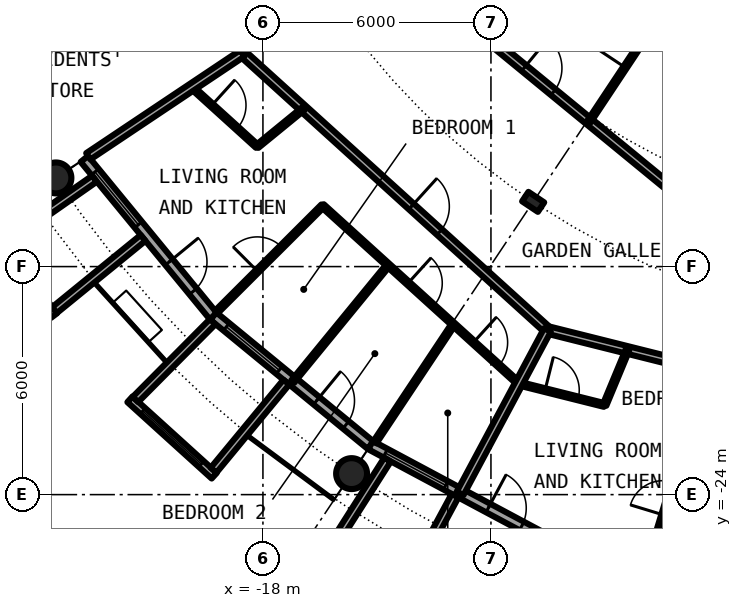
"""IFC4 building model, lengths in metres.
Left out: names, types, materials, properties, quantities, classifications, styles, units other than length and angle.
Written with IfcOpenShell. Run it as: python <this file> out.ifc"""

import sys

from ifc_helpers import new_model, si_unit, direction, frame, frame_2d, origin, origin_2d, place, context, subcontext, project, spatial, rectangle, circle, hollow_circle, i_section, extrude, element, fill, save


model = new_model("IFC4")
c1 = context("Model", 3, precision=1e-05, world=origin(), true_north=direction((0.0, 1.0)))
c2 = subcontext(c1, "Body", "Model", "MODEL_VIEW")
j1 = project(units=[si_unit("LENGTHUNIT", "METRE"), si_unit("PLANEANGLEUNIT", "RADIAN")], contexts=[c1])
p1 = place(None, origin())
s1 = spatial("IfcSite", under=j1, at=p1, CompositionType="ELEMENT")
p2 = place(p1, origin())
s2 = spatial("IfcBuilding", under=s1, at=p2, CompositionType="ELEMENT")
p3 = place(p2, frame((0.0, 0.0, 161.6)))
s3 = spatial("IfcBuildingStorey", under=s2, at=p3, CompositionType="ELEMENT", Elevation=161.6)
for number, where, z_axis, x_axis in (
    (1, (-23.448, -15.667, 0.0), (0.0, 0.0, 1.0), (1.0, 0.0, 0.0)),
    (2, (-15.667, -23.448, 0.0), (0.0, 0.0, 1.0), (1.0, 0.0, 0.0)),
):
    element("IfcColumn", number, at=place(p3, frame(where, z_axis=z_axis, x_axis=x_axis)), inside=s3, PredefinedType="COLUMN", context=c2, shape_type="SweptSolid", body=[
        extrude(hollow_circle(Radius=0.406, WallThickness=0.04, at=origin_2d()), origin(), (0.0, 0.0, 1.0), 3.05),
    ])
p4 = place(p3, frame((-10.889, -16.297, 0.0), z_axis=(0.0, 0.0, 1.0), x_axis=(-0.55557023302, -0.831469612303, 0.0)))
e3 = element("IfcColumn", 3, at=p4, inside=s3, PredefinedType="COLUMN", context=c2, shape_type="SweptSolid", body=[
    extrude(i_section(OverallWidth=0.3, OverallDepth=0.5, WebThickness=0.014, FlangeThickness=0.028, FilletRadius=0.027, at=origin_2d()), origin(), (0.0, 0.0, 1.0), 3.05),
])
p5 = place(p3, frame((-22.699, -15.167, 0.0), z_axis=(0.0, 0.0, 1.0), x_axis=(0.634382322723, -0.773019449054, 0.0)))
e4 = element("IfcWall", 4, at=p5, inside=s3, PredefinedType="SOLIDWALL", context=c2, shape_type="SweptSolid", body=[
    extrude(rectangle(XDim=5.352, YDim=0.25, at=frame_2d((2.676, 0.0))), origin(), (0.0, 0.0, 1.0), 2.7),
])
p6 = place(p5, frame((0.441, 0.0, 0.3)))
e5 = element("IfcOpeningElement", 5, at=p6, cuts=e4, PredefinedType="OPENING", context=c2, shape_type="SweptSolid", body=[
    extrude(rectangle(XDim=1.8, YDim=2.1, at=frame_2d((0.9, 1.05))), frame((0.0, 0.135, 0.0), z_axis=(0.0, -1.0, 0.0), x_axis=(1.0, 0.0, 0.0)), (0.0, 0.0, 1.0), 0.27),
])
p7 = place(p5, frame((3.51, 0.0, 0.0)))
e6 = element("IfcOpeningElement", 6, at=p7, cuts=e4, PredefinedType="OPENING", context=c2, shape_type="SweptSolid", body=[
    extrude(rectangle(XDim=1.0, YDim=2.2, at=frame_2d((0.5, 1.1))), frame((0.0, 0.135, 0.0), z_axis=(0.0, -1.0, 0.0), x_axis=(1.0, 0.0, 0.0)), (0.0, 0.0, 1.0), 0.27),
])
p8 = place(p3, frame((-24.972, -17.337, -0.03), z_axis=(0.0, 0.0, 1.0), x_axis=(0.602806268067, -0.797887588059, 0.0)))
e7 = element("IfcWall", 7, at=p8, inside=s3, PredefinedType="SOLIDWALL", context=c2, shape_type="SweptSolid", body=[
    extrude(rectangle(XDim=2.447, YDim=0.2, at=frame_2d((1.223, 0.0))), origin(), (0.0, 0.0, 1.0), 2.73),
])
p9 = place(p8, frame((0.183, 0.0, 0.33)))
e8 = element("IfcOpeningElement", 8, at=p9, cuts=e7, PredefinedType="OPENING", context=c2, shape_type="SweptSolid", body=[
    extrude(circle(Radius=1.04, at=frame_2d((1.04, 1.04))), frame((0.0, 0.11, 0.0), z_axis=(0.0, -1.0, 0.0), x_axis=(1.0, 0.0, 0.0)), (0.0, 0.0, 1.0), 0.22),
])
p10 = place(p3, frame((-22.433, -15.688, -0.03), z_axis=(0.0, 0.0, 1.0), x_axis=(-0.819373043115, -0.573260687834, 0.0)))
e9 = element("IfcWall", 9, at=p10, inside=s3, PredefinedType="SOLIDWALL", context=c2, shape_type="SweptSolid", body=[
    extrude(rectangle(XDim=2.925, YDim=0.2, at=frame_2d((1.463, 0.0))), origin(), (0.0, 0.0, 1.0), 2.73),
])
p11 = place(p3, frame((-21.155, -17.246, -0.03), z_axis=(0.0, 0.0, 1.0), x_axis=(-0.775179004516, -0.631741648902, 0.0)))
e10 = element("IfcWall", 10, at=p11, inside=s3, PredefinedType="SOLIDWALL", context=c2, shape_type="SweptSolid", body=[
    extrude(rectangle(XDim=3.006, YDim=0.2, at=frame_2d((1.503, 0.0))), origin(), (0.0, 0.0, 1.0), 2.73),
])
p12 = place(p3, frame((-19.304, -19.304, 0.0), z_axis=(0.0, 0.0, 1.0), x_axis=(0.773019449054, -0.634382322723, 0.0)))
e11 = element("IfcWall", 11, at=p12, inside=s3, PredefinedType="SOLIDWALL", context=c2, shape_type="SweptSolid", body=[
    extrude(rectangle(XDim=5.352, YDim=0.25, at=frame_2d((2.676, 0.0))), origin(), (0.0, 0.0, 1.0), 2.7),
])
p13 = place(p12, frame((0.441, 0.0, 0.3)))
e12 = element("IfcOpeningElement", 12, at=p13, cuts=e11, PredefinedType="OPENING", context=c2, shape_type="SweptSolid", body=[
    extrude(rectangle(XDim=1.8, YDim=2.1, at=frame_2d((0.9, 1.05))), frame((0.0, 0.135, 0.0), z_axis=(0.0, -1.0, 0.0), x_axis=(1.0, 0.0, 0.0)), (0.0, 0.0, 1.0), 0.27),
])
p14 = place(p12, frame((3.51, 0.0, 0.0)))
e13 = element("IfcOpeningElement", 13, at=p14, cuts=e11, PredefinedType="OPENING", context=c2, shape_type="SweptSolid", body=[
    extrude(rectangle(XDim=1.0, YDim=2.2, at=frame_2d((0.5, 1.1))), frame((0.0, 0.135, 0.0), z_axis=(0.0, -1.0, 0.0), x_axis=(1.0, 0.0, 0.0)), (0.0, 0.0, 1.0), 0.27),
])
p15 = place(p3, frame((-21.5, -21.493, -0.03), z_axis=(0.0, 0.0, 1.0), x_axis=(0.740998365753, -0.671506829416, 0.0)))
e14 = element("IfcWall", 14, at=p15, inside=s3, PredefinedType="SOLIDWALL", context=c2, shape_type="SweptSolid", body=[
    extrude(rectangle(XDim=2.993, YDim=0.2, at=frame_2d((1.497, 0.0))), origin(), (0.0, 0.0, 1.0), 2.73),
])
p16 = place(p15, frame((0.457, 0.0, 0.33)))
e15 = element("IfcOpeningElement", 15, at=p16, cuts=e14, PredefinedType="OPENING", context=c2, shape_type="SweptSolid", body=[
    extrude(circle(Radius=1.04, at=frame_2d((1.04, 1.04))), frame((0.0, 0.11, 0.0), z_axis=(0.0, -1.0, 0.0), x_axis=(1.0, 0.0, 0.0)), (0.0, 0.0, 1.0), 0.22),
])
p17 = place(p3, frame((-19.323, -19.45, -0.03), z_axis=(0.0, 0.0, 1.0), x_axis=(-0.704476739375, -0.709727076896, 0.0)))
e16 = element("IfcWall", 16, at=p17, inside=s3, PredefinedType="SOLIDWALL", context=c2, shape_type="SweptSolid", body=[
    extrude(rectangle(XDim=2.883, YDim=0.2, at=frame_2d((1.441, 0.0))), origin(), (0.0, 0.0, 1.0), 2.73),
])
p18 = place(p3, frame((-17.384, -21.041, -0.03), z_axis=(0.0, 0.0, 1.0), x_axis=(-0.63709551667, -0.770784861449, 0.0)))
e17 = element("IfcWall", 17, at=p18, inside=s3, PredefinedType="SOLIDWALL", context=c2, shape_type="SweptSolid", body=[
    extrude(rectangle(XDim=3.006, YDim=0.2, at=frame_2d((1.503, 0.0))), origin(), (0.0, 0.0, 1.0), 2.73),
])
p19 = place(p3, frame((-15.167, -22.699, 0.0), z_axis=(0.0, 0.0, 1.0), x_axis=(0.881915646801, -0.471407246368, 0.0)))
e18 = element("IfcWall", 18, at=p19, inside=s3, PredefinedType="SOLIDWALL", context=c2, shape_type="SweptSolid", body=[
    extrude(rectangle(XDim=5.352, YDim=0.25, at=frame_2d((2.676, 0.0))), origin(), (0.0, 0.0, 1.0), 2.7),
])
p20 = place(p19, frame((0.441, 0.0, 0.3)))
e19 = element("IfcOpeningElement", 19, at=p20, cuts=e18, PredefinedType="OPENING", context=c2, shape_type="SweptSolid", body=[
    extrude(rectangle(XDim=1.8, YDim=2.1, at=frame_2d((0.9, 1.05))), frame((0.0, 0.135, 0.0), z_axis=(0.0, -1.0, 0.0), x_axis=(1.0, 0.0, 0.0)), (0.0, 0.0, 1.0), 0.27),
])
p21 = place(p19, frame((3.51, 0.0, 0.0)))
e20 = element("IfcOpeningElement", 20, at=p21, cuts=e18, PredefinedType="OPENING", context=c2, shape_type="SweptSolid", body=[
    extrude(rectangle(XDim=1.0, YDim=2.2, at=frame_2d((0.5, 1.1))), frame((0.0, 0.135, 0.0), z_axis=(0.0, -1.0, 0.0), x_axis=(1.0, 0.0, 0.0)), (0.0, 0.0, 1.0), 0.27),
])
p22 = place(p3, frame((-14.722, -23.079, -0.03), z_axis=(0.0, 0.0, 1.0), x_axis=(-0.537572179146, -0.843217737129, 0.0)))
e21 = element("IfcWall", 21, at=p22, inside=s3, PredefinedType="SOLIDWALL", context=c2, shape_type="SweptSolid", body=[
    extrude(rectangle(XDim=2.924, YDim=0.2, at=frame_2d((1.462, 0.0))), origin(), (0.0, 0.0, 1.0), 2.73),
])
p23 = place(p3, frame((-12.945, -24.029, -0.03), z_axis=(0.0, 0.0, 1.0), x_axis=(-0.474424310775, -0.88029629861, 0.0)))
e22 = element("IfcWall", 22, at=p23, inside=s3, PredefinedType="SOLIDWALL", context=c2, shape_type="SweptSolid", body=[
    extrude(rectangle(XDim=3.006, YDim=0.2, at=frame_2d((1.503, 0.0))), origin(), (0.0, 0.0, 1.0), 2.73),
])
p24 = place(p3, frame((-19.872, -13.278, 0.0), z_axis=(0.0, 0.0, 1.0), x_axis=(0.740990220108, -0.671515817911, 0.0)))
e23 = element("IfcWall", 23, at=p24, inside=s3, PredefinedType="PARTITIONING", context=c2, shape_type="SweptSolid", body=[
    extrude(rectangle(XDim=2.323, YDim=0.1, at=frame_2d((1.161, 0.0))), origin(), (0.0, 0.0, 1.0), 2.7),
])
p25 = place(p24, frame((0.711, 0.0, 0.0)))
e24 = element("IfcOpeningElement", 24, at=p25, cuts=e23, PredefinedType="OPENING", context=c2, shape_type="SweptSolid", body=[
    extrude(rectangle(XDim=0.9, YDim=2.3, at=frame_2d((0.45, 1.15))), frame((0.0, 0.06, 0.0), z_axis=(0.0, -1.0, 0.0), x_axis=(1.0, 0.0, 0.0)), (0.0, 0.0, 1.0), 0.12),
])
p26 = place(p3, frame((-16.432, -16.396, 0.0), z_axis=(0.0, 0.0, 1.0), x_axis=(0.740901429238, -0.671613781986, 0.0)))
e25 = element("IfcWall", 25, at=p26, inside=s3, PredefinedType="PARTITIONING", context=c2, shape_type="SweptSolid", body=[
    extrude(rectangle(XDim=6.97, YDim=0.1, at=frame_2d((3.485, 0.0))), origin(), (0.0, 0.0, 1.0), 2.7),
])
p27 = place(p26, frame((3.038, 0.0, 0.0)))
e26 = element("IfcOpeningElement", 26, at=p27, cuts=e25, PredefinedType="OPENING", context=c2, shape_type="SweptSolid", body=[
    extrude(rectangle(XDim=0.9, YDim=2.3, at=frame_2d((0.45, 1.15))), frame((0.0, 0.06, 0.0), z_axis=(0.0, -1.0, 0.0), x_axis=(1.0, 0.0, 0.0)), (0.0, 0.0, 1.0), 0.12),
])
p28 = place(p26, frame((5.36, 0.0, 0.0)))
e27 = element("IfcOpeningElement", 27, at=p28, cuts=e25, PredefinedType="OPENING", context=c2, shape_type="SweptSolid", body=[
    extrude(rectangle(XDim=0.9, YDim=2.3, at=frame_2d((0.45, 1.15))), frame((0.0, 0.06, 0.0), z_axis=(0.0, -1.0, 0.0), x_axis=(1.0, 0.0, 0.0)), (0.0, 0.0, 1.0), 0.12),
])
p29 = place(p3, frame((-11.268, -21.078, 0.0), z_axis=(0.0, 0.0, 1.0), x_axis=(0.970018653366, -0.243030475708, 0.0)))
e28 = element("IfcWall", 28, at=p29, inside=s3, PredefinedType="PARTITIONING", context=c2, shape_type="SweptSolid", body=[
    extrude(rectangle(XDim=2.322, YDim=0.1, at=frame_2d((1.161, 0.0))), origin(), (0.0, 0.0, 1.0), 2.7),
])
p30 = place(p29, frame((0.713, 0.0, 0.0)))
e29 = element("IfcOpeningElement", 29, at=p30, cuts=e28, PredefinedType="OPENING", context=c2, shape_type="SweptSolid", body=[
    extrude(rectangle(XDim=0.9, YDim=2.3, at=frame_2d((0.45, 1.15))), frame((0.0, 0.06, 0.0), z_axis=(0.0, -1.0, 0.0), x_axis=(1.0, 0.0, 0.0)), (0.0, 0.0, 1.0), 0.12),
])
p31 = place(p3, frame((-19.307, -10.935, 0.0), z_axis=(0.0, 0.0, 1.0), x_axis=(0.465605550524, -0.884992356646, 0.0)))
e30 = element("IfcWall", 30, at=p31, inside=s3, PredefinedType="PARTITIONING", context=c2, shape_type="SweptSolid", body=[
    extrude(rectangle(XDim=1.643, YDim=0.2, at=frame_2d((0.821, 0.0))), origin(), (0.0, 0.0, 1.0), 2.7),
])
p32 = place(p3, frame((-18.542, -12.389, 0.0), z_axis=(0.0, 0.0, 1.0), x_axis=(0.740947367223, -0.671563101283, 0.0)))
e31 = element("IfcWall", 31, at=p32, inside=s3, PredefinedType="PARTITIONING", context=c2, shape_type="SweptSolid", body=[
    extrude(rectangle(XDim=10.837, YDim=0.2, at=frame_2d((5.419, 0.0))), origin(), (0.0, 0.0, 1.0), 2.7),
])
p33 = place(p32, frame((6.002, 0.0, 0.0)))
e32 = element("IfcOpeningElement", 32, at=p33, cuts=e31, PredefinedType="OPENING", context=c2, shape_type="SweptSolid", body=[
    extrude(rectangle(XDim=1.0, YDim=2.3, at=frame_2d((0.5, 1.15))), frame((0.0, 0.11, 0.0), z_axis=(0.0, -1.0, 0.0), x_axis=(1.0, 0.0, 0.0)), (0.0, 0.0, 1.0), 0.22),
])
p34 = place(p3, frame((-10.518, -19.665, 0.0), z_axis=(0.0, 0.0, 1.0), x_axis=(0.970023181991, -0.243012399685, 0.0)))
e33 = element("IfcWall", 33, at=p34, inside=s3, PredefinedType="PARTITIONING", context=c2, shape_type="SweptSolid", body=[
    extrude(rectangle(XDim=10.843, YDim=0.2, at=frame_2d((5.421, 0.0))), origin(), (0.0, 0.0, 1.0), 2.7),
])
p35 = place(p34, frame((6.008, 0.0, 0.0)))
e34 = element("IfcOpeningElement", 34, at=p35, cuts=e33, PredefinedType="OPENING", context=c2, shape_type="SweptSolid", body=[
    extrude(rectangle(XDim=1.0, YDim=2.3, at=frame_2d((0.5, 1.15))), frame((0.0, 0.11, 0.0), z_axis=(0.0, -1.0, 0.0), x_axis=(1.0, 0.0, 0.0)), (0.0, 0.0, 1.0), 0.22),
])
p36 = place(p3, frame((-14.717, -9.834, 0.0), z_axis=(0.0, 0.0, 1.0), x_axis=(0.773034536097, -0.634363938131, 0.0)))
e35 = element("IfcWall", 35, at=p36, inside=s3, PredefinedType="PARTITIONING", context=c2, shape_type="SweptSolid", body=[
    extrude(rectangle(XDim=10.277, YDim=0.2, at=frame_2d((5.138, 0.0))), origin(), (0.0, 0.0, 1.0), 2.7),
])
p37 = place(p36, frame((4.638, 0.0, 0.0)))
e36 = element("IfcOpeningElement", 36, at=p37, cuts=e35, PredefinedType="OPENING", context=c2, shape_type="SweptSolid", body=[
    extrude(rectangle(XDim=1.0, YDim=2.3, at=frame_2d((0.5, 1.15))), frame((0.0, 0.11, 0.0), z_axis=(0.0, -1.0, 0.0), x_axis=(1.0, 0.0, 0.0)), (0.0, 0.0, 1.0), 0.22),
])
p38 = place(p3, frame((-22.595, -15.098, 0.0), z_axis=(0.0, 0.0, 1.0), x_axis=(0.831387096605, 0.55569370664, 0.0)))
e37 = element("IfcWall", 37, at=p38, inside=s3, PredefinedType="PARTITIONING", context=c2, shape_type="SweptSolid", body=[
    extrude(rectangle(XDim=4.875, YDim=0.2, at=frame_2d((2.438, 0.0))), origin(), (0.0, 0.0, 1.0), 2.7),
])
p39 = place(p3, frame((-19.231, -19.2, 0.0), z_axis=(0.0, 0.0, 1.0), x_axis=(0.707722727509, 0.706490297858, 0.0)))
e38 = element("IfcWall", 38, at=p39, inside=s3, PredefinedType="PARTITIONING", context=c2, shape_type="SweptSolid", body=[
    extrude(rectangle(XDim=3.962, YDim=0.1, at=frame_2d((1.981, 0.0))), origin(), (0.0, 0.0, 1.0), 2.7),
])
p40 = place(p39, frame((1.531, 0.0, 0.0)))
e39 = element("IfcOpeningElement", 39, at=p40, cuts=e38, PredefinedType="OPENING", context=c2, shape_type="SweptSolid", body=[
    extrude(rectangle(XDim=0.9, YDim=2.3, at=frame_2d((0.45, 1.15))), frame((0.0, 0.06, 0.0), z_axis=(0.0, -1.0, 0.0), x_axis=(1.0, 0.0, 0.0)), (0.0, 0.0, 1.0), 0.12),
])
p41 = place(p3, frame((-18.151, -14.838, 0.0), z_axis=(0.0, 0.0, 1.0), x_axis=(0.774283039722, 0.632839453889, 0.0)))
e40 = element("IfcWall", 40, at=p41, inside=s3, PredefinedType="PARTITIONING", context=c2, shape_type="SweptSolid", body=[
    extrude(rectangle(XDim=1.569, YDim=0.1, at=frame_2d((0.785, 0.0))), origin(), (0.0, 0.0, 1.0), 2.7),
])
p42 = place(p3, frame((-17.216, -21.026, 0.0), z_axis=(0.0, 0.0, 1.0), x_axis=(0.633590098448, 0.773668913133, 0.0)))
e41 = element("IfcWall", 41, at=p42, inside=s3, PredefinedType="PARTITIONING", context=c2, shape_type="SweptSolid", body=[
    extrude(rectangle(XDim=3.962, YDim=0.1, at=frame_2d((1.981, 0.0))), origin(), (0.0, 0.0, 1.0), 2.7),
])
p43 = place(p3, frame((-15.054, -22.624, 0.0), z_axis=(0.0, 0.0, 1.0), x_axis=(0.553823887887, 0.83263383381, 0.0)))
e42 = element("IfcWall", 42, at=p43, inside=s3, PredefinedType="PARTITIONING", context=c2, shape_type="SweptSolid", body=[
    extrude(rectangle(XDim=3.73, YDim=0.1, at=frame_2d((1.865, 0.0))), origin(), (0.0, 0.0, 1.0), 2.7),
])
p44 = place(p3, frame((-12.81, -23.966, 0.0), z_axis=(0.0, 0.0, 1.0), x_axis=(0.471427642527, 0.881904744211, 0.0)))
e43 = element("IfcWall", 43, at=p44, inside=s3, PredefinedType="PARTITIONING", context=c2, shape_type="SweptSolid", body=[
    extrude(rectangle(XDim=4.875, YDim=0.2, at=frame_2d((2.438, 0.0))), origin(), (0.0, 0.0, 1.0), 2.7),
])
p45 = place(p3, frame((-9.418, -14.182, 0.0), z_axis=(0.0, 0.0, 1.0), x_axis=(0.553303732327, 0.832979579457, 0.0)))
e44 = element("IfcWall", 44, at=p45, inside=s3, PredefinedType="PARTITIONING", context=c2, shape_type="SweptSolid", body=[
    extrude(rectangle(XDim=4.319, YDim=0.1, at=frame_2d((2.16, 0.0))), origin(), (0.0, 0.0, 1.0), 2.7),
])
p46 = place(p45, frame((1.71, 0.0, 0.0)))
e45 = element("IfcOpeningElement", 45, at=p46, cuts=e44, PredefinedType="OPENING", context=c2, shape_type="SweptSolid", body=[
    extrude(rectangle(XDim=0.9, YDim=2.3, at=frame_2d((0.45, 1.15))), frame((0.0, 0.06, 0.0), z_axis=(0.0, -1.0, 0.0), x_axis=(1.0, 0.0, 0.0)), (0.0, 0.0, 1.0), 0.12),
])
p47 = place(p3, frame((-9.01, -21.643, 0.0), z_axis=(0.0, 0.0, 1.0), x_axis=(0.384228756538, 0.923237923099, 0.0)))
e46 = element("IfcWall", 46, at=p47, inside=s3, PredefinedType="PARTITIONING", context=c2, shape_type="SweptSolid", body=[
    extrude(rectangle(XDim=1.569, YDim=0.1, at=frame_2d((0.785, 0.0))), origin(), (0.0, 0.0, 1.0), 2.7),
])
p48 = place(p3, frame((-7.914, -25.997, 0.0), z_axis=(0.0, 0.0, 1.0), x_axis=(0.291291575636, 0.956634317785, 0.0)))
e47 = element("IfcWall", 47, at=p48, inside=s3, PredefinedType="PARTITIONING", context=c2, shape_type="SweptSolid", body=[
    extrude(rectangle(XDim=3.962, YDim=0.1, at=frame_2d((1.981, 0.0))), origin(), (0.0, 0.0, 1.0), 2.7),
])
p49 = place(p48, frame((1.531, 0.0, 0.0)))
e48 = element("IfcOpeningElement", 48, at=p49, cuts=e47, PredefinedType="OPENING", context=c2, shape_type="SweptSolid", body=[
    extrude(rectangle(XDim=0.9, YDim=2.3, at=frame_2d((0.45, 1.15))), frame((0.0, 0.06, 0.0), z_axis=(0.0, -1.0, 0.0), x_axis=(1.0, 0.0, 0.0)), (0.0, 0.0, 1.0), 0.12),
])
p50 = place(p6, origin())
e49 = element("IfcWindow", 49, at=p50, inside=s3, PartitioningType="SINGLE_PANEL", PredefinedType="WINDOW", context=c2, shape_type="SweptSolid", body=[
    extrude(rectangle(XDim=1.8, YDim=2.1, at=frame_2d((0.9, 1.05))), frame((0.0, 0.03, 0.0), z_axis=(0.0, -1.0, 0.0), x_axis=(1.0, 0.0, 0.0)), (0.0, 0.0, 1.0), 0.06),
])
fill(e5, e49)
p51 = place(p7, origin())
e50 = element("IfcDoor", 50, at=p51, inside=s3, OperationType="SINGLE_SWING_LEFT", PredefinedType="DOOR", context=c2, shape_type="SweptSolid", body=[
    extrude(rectangle(XDim=1.0, YDim=2.2, at=frame_2d((0.5, 1.1))), frame((0.0, 0.025, 0.0), z_axis=(0.0, -1.0, 0.0), x_axis=(1.0, 0.0, 0.0)), (0.0, 0.0, 1.0), 0.05),
])
fill(e6, e50)
p52 = place(p13, origin())
e51 = element("IfcWindow", 51, at=p52, inside=s3, PartitioningType="SINGLE_PANEL", PredefinedType="WINDOW", context=c2, shape_type="SweptSolid", body=[
    extrude(rectangle(XDim=1.8, YDim=2.1, at=frame_2d((0.9, 1.05))), frame((0.0, 0.03, 0.0), z_axis=(0.0, -1.0, 0.0), x_axis=(1.0, 0.0, 0.0)), (0.0, 0.0, 1.0), 0.06),
])
fill(e12, e51)
p53 = place(p16, origin())
e52 = element("IfcWindow", 52, at=p53, inside=s3, PartitioningType="SINGLE_PANEL", PredefinedType="WINDOW", context=c2, shape_type="SweptSolid", body=[
    extrude(circle(Radius=1.04, at=frame_2d((1.04, 1.04))), frame((0.0, 0.03, 0.0), z_axis=(0.0, -1.0, 0.0), x_axis=(1.0, 0.0, 0.0)), (0.0, 0.0, 1.0), 0.06),
])
fill(e15, e52)
p54 = place(p14, origin())
e53 = element("IfcDoor", 53, at=p54, inside=s3, OperationType="SINGLE_SWING_LEFT", PredefinedType="DOOR", context=c2, shape_type="SweptSolid", body=[
    extrude(rectangle(XDim=1.0, YDim=2.2, at=frame_2d((0.5, 1.1))), frame((0.0, 0.025, 0.0), z_axis=(0.0, -1.0, 0.0), x_axis=(1.0, 0.0, 0.0)), (0.0, 0.0, 1.0), 0.05),
])
fill(e13, e53)
p55 = place(p20, origin())
e54 = element("IfcWindow", 54, at=p55, inside=s3, PartitioningType="SINGLE_PANEL", PredefinedType="WINDOW", context=c2, shape_type="SweptSolid", body=[
    extrude(rectangle(XDim=1.8, YDim=2.1, at=frame_2d((0.9, 1.05))), frame((0.0, 0.03, 0.0), z_axis=(0.0, -1.0, 0.0), x_axis=(1.0, 0.0, 0.0)), (0.0, 0.0, 1.0), 0.06),
])
fill(e19, e54)
p56 = place(p21, origin())
e55 = element("IfcDoor", 55, at=p56, inside=s3, OperationType="SINGLE_SWING_LEFT", PredefinedType="DOOR", context=c2, shape_type="SweptSolid", body=[
    extrude(rectangle(XDim=1.0, YDim=2.2, at=frame_2d((0.5, 1.1))), frame((0.0, 0.025, 0.0), z_axis=(0.0, -1.0, 0.0), x_axis=(1.0, 0.0, 0.0)), (0.0, 0.0, 1.0), 0.05),
])
fill(e20, e55)
p57 = place(p33, origin())
e56 = element("IfcDoor", 56, at=p57, inside=s3, OperationType="SINGLE_SWING_RIGHT", PredefinedType="DOOR", context=c2, shape_type="SweptSolid", body=[
    extrude(rectangle(XDim=1.0, YDim=2.3, at=frame_2d((0.5, 1.15))), frame((0.0, 0.025, 0.0), z_axis=(0.0, -1.0, 0.0), x_axis=(1.0, 0.0, 0.0)), (0.0, 0.0, 1.0), 0.05),
])
fill(e32, e56)
p58 = place(p25, origin())
e57 = element("IfcDoor", 57, at=p58, inside=s3, OperationType="SINGLE_SWING_RIGHT", PredefinedType="DOOR", context=c2, shape_type="SweptSolid", body=[
    extrude(rectangle(XDim=0.9, YDim=2.3, at=frame_2d((0.45, 1.15))), frame((0.0, 0.025, 0.0), z_axis=(0.0, -1.0, 0.0), x_axis=(1.0, 0.0, 0.0)), (0.0, 0.0, 1.0), 0.05),
])
fill(e24, e57)
p59 = place(p40, origin())
e58 = element("IfcDoor", 58, at=p59, inside=s3, OperationType="SINGLE_SWING_LEFT", PredefinedType="DOOR", context=c2, shape_type="SweptSolid", body=[
    extrude(rectangle(XDim=0.9, YDim=2.3, at=frame_2d((0.45, 1.15))), frame((0.0, 0.025, 0.0), z_axis=(0.0, -1.0, 0.0), x_axis=(1.0, 0.0, 0.0)), (0.0, 0.0, 1.0), 0.05),
])
fill(e39, e58)
p60 = place(p27, origin())
e59 = element("IfcDoor", 59, at=p60, inside=s3, OperationType="SINGLE_SWING_RIGHT", PredefinedType="DOOR", context=c2, shape_type="SweptSolid", body=[
    extrude(rectangle(XDim=0.9, YDim=2.3, at=frame_2d((0.45, 1.15))), frame((0.0, 0.025, 0.0), z_axis=(0.0, -1.0, 0.0), x_axis=(1.0, 0.0, 0.0)), (0.0, 0.0, 1.0), 0.05),
])
fill(e26, e59)
p61 = place(p28, origin())
e60 = element("IfcDoor", 60, at=p61, inside=s3, OperationType="SINGLE_SWING_RIGHT", PredefinedType="DOOR", context=c2, shape_type="SweptSolid", body=[
    extrude(rectangle(XDim=0.9, YDim=2.3, at=frame_2d((0.45, 1.15))), frame((0.0, 0.025, 0.0), z_axis=(0.0, -1.0, 0.0), x_axis=(1.0, 0.0, 0.0)), (0.0, 0.0, 1.0), 0.05),
])
fill(e27, e60)
p62 = place(p30, origin())
e61 = element("IfcDoor", 61, at=p62, inside=s3, OperationType="SINGLE_SWING_RIGHT", PredefinedType="DOOR", context=c2, shape_type="SweptSolid", body=[
    extrude(rectangle(XDim=0.9, YDim=2.3, at=frame_2d((0.45, 1.15))), frame((0.0, 0.025, 0.0), z_axis=(0.0, -1.0, 0.0), x_axis=(1.0, 0.0, 0.0)), (0.0, 0.0, 1.0), 0.05),
])
fill(e29, e61)
p63 = place(p37, origin())
e62 = element("IfcDoor", 62, at=p63, inside=s3, OperationType="SINGLE_SWING_LEFT", PredefinedType="DOOR", context=c2, shape_type="SweptSolid", body=[
    extrude(rectangle(XDim=1.0, YDim=2.3, at=frame_2d((0.5, 1.15))), frame((0.0, 0.025, 0.0), z_axis=(0.0, -1.0, 0.0), x_axis=(1.0, 0.0, 0.0)), (0.0, 0.0, 1.0), 0.05),
])
fill(e36, e62)
p64 = place(p46, origin())
e63 = element("IfcDoor", 63, at=p64, inside=s3, OperationType="SINGLE_SWING_RIGHT", PredefinedType="DOOR", context=c2, shape_type="SweptSolid", body=[
    extrude(rectangle(XDim=0.9, YDim=2.3, at=frame_2d((0.45, 1.15))), frame((0.0, 0.025, 0.0), z_axis=(0.0, -1.0, 0.0), x_axis=(1.0, 0.0, 0.0)), (0.0, 0.0, 1.0), 0.05),
])
fill(e45, e63)
save(model, sys.argv[1])
